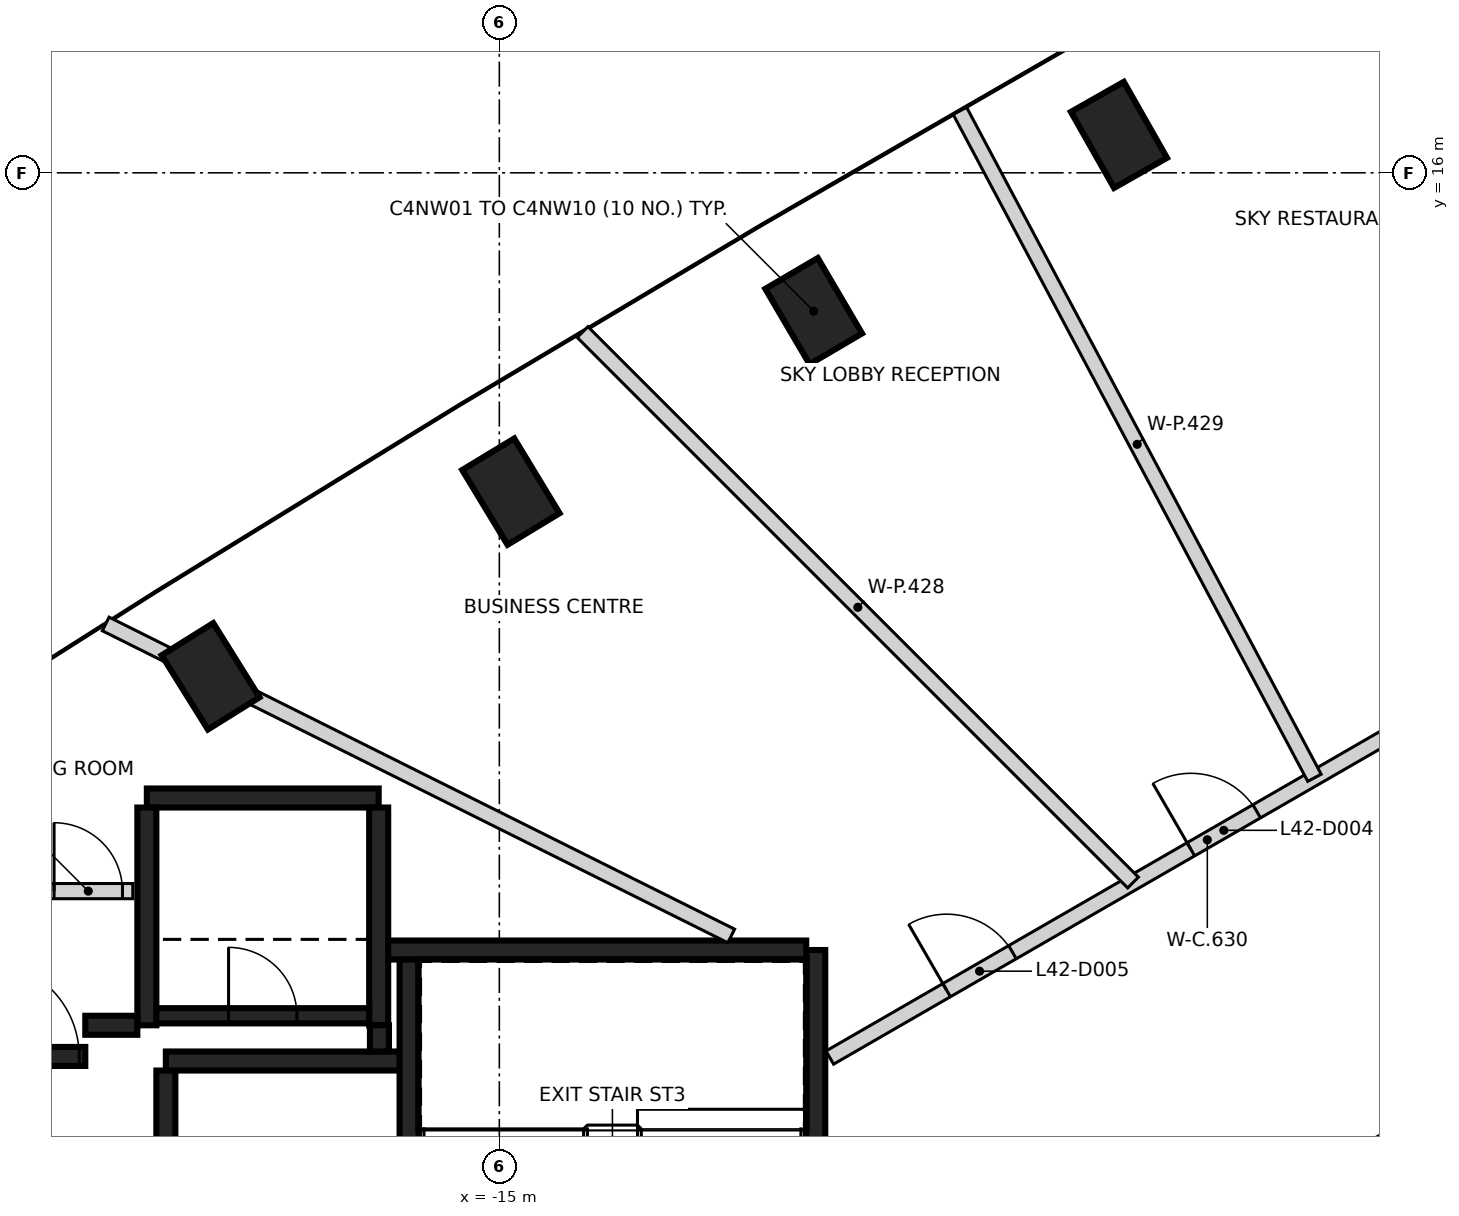
"""IFC4 building model, lengths in metres.
Left out: names, types, materials, properties, quantities, classifications, styles, units other than length and angle.
Written with IfcOpenShell. Run it as: python <this file> out.ifc"""

import sys

from ifc_helpers import new_model, si_unit, direction, frame, frame_2d, origin, origin_2d, place, context, subcontext, project, spatial, rectangle, extrude, element, fill, save


model = new_model("IFC4")
c1 = context("Model", 3, precision=1e-05, world=origin(), true_north=direction((0.0, 1.0)))
c2 = subcontext(c1, "Body", "Model", "MODEL_VIEW")
j1 = project(units=[si_unit("LENGTHUNIT", "METRE"), si_unit("PLANEANGLEUNIT", "RADIAN")], contexts=[c1])
p1 = place(None, origin())
s1 = spatial("IfcSite", under=j1, at=p1, CompositionType="ELEMENT")
p2 = place(p1, origin())
s2 = spatial("IfcBuilding", under=s1, at=p2, CompositionType="ELEMENT")
p3 = place(p2, frame((0.0, 0.0, 169.6)))
s3 = spatial("IfcBuildingStorey", under=s2, at=p3, CompositionType="ELEMENT", Elevation=169.6)
for number, where, z_axis, x_axis in (
    (1, (-6.848, 16.499, -0.35), (0.0, 0.0, 1.0), (-0.494, 0.87, 0.0)),
    (2, (-10.864, 14.18, -0.35), (0.0, 0.0, 1.0), (-0.506, 0.862, 0.0)),
    (3, (-14.848, 11.806, -0.35), (0.0, 0.0, 1.0), (-0.518, 0.855, 0.0)),
    (4, (-18.799, 9.376, -0.35), (0.0, 0.0, 1.0), (-0.529, 0.848, 0.0)),
):
    element("IfcColumn", number, at=place(p3, frame(where, z_axis=z_axis, x_axis=x_axis)), inside=s3, PredefinedType="COLUMN", context=c2, shape_type="SweptSolid", body=[
        extrude(rectangle(XDim=1.15, YDim=0.8, at=origin_2d()), origin(), (0.0, 0.0, 1.0), 6.0),
    ])
p4 = place(p3, frame((-10.837, 5.775, 0.0), z_axis=(0.0, 0.0, 1.0), x_axis=(0.0, -1.0, 0.0)))
e5 = element("IfcWall", 5, at=p4, inside=s3, PredefinedType="SHEAR", context=c2, shape_type="SweptSolid", body=[
    extrude(rectangle(XDim=11.55, YDim=0.25, at=frame_2d((5.775, 0.0))), origin(), (0.0, 0.0, 1.0), 5.65),
])
p5 = place(p4, frame((10.025, 0.0, 0.0)))
e6 = element("IfcOpeningElement", 6, at=p5, cuts=e5, PredefinedType="OPENING", context=c2, shape_type="SweptSolid", body=[
    extrude(rectangle(XDim=1.2, YDim=2.1, at=frame_2d((0.6, 1.05))), frame((0.0, 0.135, 0.0), z_axis=(0.0, -1.0, 0.0), x_axis=(1.0, 0.0, 0.0)), (0.0, 0.0, 1.0), 0.27),
])
p6 = place(p4, frame((8.725, 0.0, 0.0)))
e7 = element("IfcOpeningElement", 7, at=p6, cuts=e5, PredefinedType="OPENING", context=c2, shape_type="SweptSolid", body=[
    extrude(rectangle(XDim=1.2, YDim=2.1, at=frame_2d((0.6, 1.05))), frame((0.0, 0.135, 0.0), z_axis=(0.0, -1.0, 0.0), x_axis=(1.0, 0.0, 0.0)), (0.0, 0.0, 1.0), 0.27),
])
p7 = place(p3, frame((-16.472, 5.775, 0.0), z_axis=(0.0, 0.0, 1.0), x_axis=(1.0, 0.0, 0.0)))
e8 = element("IfcWall", 8, at=p7, inside=s3, PredefinedType="SHEAR", context=c2, shape_type="SweptSolid", body=[
    extrude(rectangle(XDim=5.51, YDim=0.25, at=frame_2d((2.755, 0.0))), origin(), (0.0, 0.0, 1.0), 5.65),
])
p8 = place(p3, frame((-19.637, 7.775, 0.0), z_axis=(0.0, 0.0, 1.0), x_axis=(1.0, 0.0, 0.0)))
e9 = element("IfcWall", 9, at=p8, inside=s3, PredefinedType="SHEAR", context=c2, shape_type="SweptSolid", body=[
    extrude(rectangle(XDim=3.05, YDim=0.25, at=frame_2d((1.525, 0.0))), origin(), (0.0, 0.0, 1.0), 5.65),
])
for number, where, z_axis, x_axis in (
    (10, (-16.587, 7.65, 0.0), (0.0, 0.0, 1.0), (0.0, -1.0, 0.0)),
    (11, (-19.637, 4.785, 0.0), (0.0, 0.0, 1.0), (0.0, 1.0, 0.0)),
):
    element("IfcWall", number, at=place(p3, frame(where, z_axis=z_axis, x_axis=x_axis)), inside=s3, PredefinedType="SHEAR", context=c2, shape_type="SweptSolid", body=[
        extrude(rectangle(XDim=2.865, YDim=0.25, at=frame_2d((1.432, 0.0))), origin(), (0.0, 0.0, 1.0), 5.65),
    ])
p9 = place(p3, frame((-16.302, 4.315, 0.0), z_axis=(0.0, 0.0, 1.0), x_axis=(-1.0, 0.0, 0.0)))
e12 = element("IfcWall", 12, at=p9, inside=s3, PredefinedType="SHEAR", context=c2, shape_type="SweptSolid", body=[
    extrude(rectangle(XDim=3.085, YDim=0.25, at=frame_2d((1.542, 0.0))), origin(), (0.0, 0.0, 1.0), 5.65),
])
p10 = place(p3, frame((-16.187, 3.2, 0.0), z_axis=(0.0, 0.0, 1.0), x_axis=(0.0, 1.0, 0.0)))
e13 = element("IfcWall", 13, at=p10, inside=s3, PredefinedType="SHEAR", context=c2, shape_type="SweptSolid", body=[
    extrude(rectangle(XDim=2.449, YDim=0.25, at=frame_2d((1.225, 0.0))), origin(), (0.0, 0.0, 1.0), 5.65),
])
p11 = place(p3, frame((-22.312, 4.375, 0.0), z_axis=(0.0, 0.0, 1.0), x_axis=(1.0, 0.0, 0.0)))
e14 = element("IfcWall", 14, at=p11, inside=s3, PredefinedType="SHEAR", context=c2, shape_type="SweptSolid", body=[
    extrude(rectangle(XDim=1.865, YDim=0.25, at=frame_2d((0.932, 0.0))), origin(), (0.0, 0.0, 1.0), 5.65),
])
p12 = place(p11, frame((0.535, 0.0, 0.0)))
e15 = element("IfcOpeningElement", 15, at=p12, cuts=e14, PredefinedType="OPENING", context=c2, shape_type="SweptSolid", body=[
    extrude(rectangle(XDim=1.25, YDim=2.1, at=frame_2d((0.625, 1.05))), frame((0.0, 0.135, 0.0), z_axis=(0.0, -1.0, 0.0), x_axis=(1.0, 0.0, 0.0)), (0.0, 0.0, 1.0), 0.27),
])
p13 = place(p3, frame((-19.387, 4.19, 0.0), z_axis=(0.0, 0.0, 1.0), x_axis=(0.0, -1.0, 0.0)))
e16 = element("IfcWall", 16, at=p13, inside=s3, PredefinedType="SHEAR", context=c2, shape_type="SweptSolid", body=[
    extrude(rectangle(XDim=0.989, YDim=0.25, at=frame_2d((0.495, 0.0))), origin(), (0.0, 0.0, 1.0), 5.65),
])
p14 = place(p3, frame((-20.447, 4.785, 0.0), z_axis=(0.0, 0.0, 1.0), x_axis=(1.0, 0.0, 0.0)))
e17 = element("IfcWall", 17, at=p14, inside=s3, PredefinedType="SHEAR", context=c2, shape_type="SweptSolid", body=[
    extrude(rectangle(XDim=0.685, YDim=0.25, at=frame_2d((0.342, 0.0))), origin(), (0.0, 0.0, 1.0), 5.65),
])
p15 = place(p3, frame((-16.577, 4.785, 0.0), z_axis=(0.0, 0.0, 1.0), x_axis=(0.0, -1.0, 0.0)))
e18 = element("IfcWall", 18, at=p15, inside=s3, PredefinedType="SHEAR", context=c2, shape_type="SweptSolid", body=[
    extrude(rectangle(XDim=0.344, YDim=0.25, at=frame_2d((0.172, 0.0))), origin(), (0.0, 0.0, 1.0), 5.65),
])
p16 = place(p3, frame((-19.511, 4.91, 0.0), z_axis=(0.0, 0.0, 1.0), x_axis=(1.0, 0.0, 0.0)))
e19 = element("IfcWall", 19, at=p16, inside=s3, PredefinedType="SHEAR", context=c2, shape_type="SweptSolid", body=[
    extrude(rectangle(XDim=2.798, YDim=0.2, at=frame_2d((1.399, 0.0))), origin(), (0.0, 0.0, 1.0), 5.65),
])
p17 = place(p16, frame((0.949, 0.0, 0.0)))
e20 = element("IfcOpeningElement", 20, at=p17, cuts=e19, PredefinedType="OPENING", context=c2, shape_type="SweptSolid", body=[
    extrude(rectangle(XDim=0.9, YDim=2.1, at=frame_2d((0.45, 1.05))), frame((0.0, 0.11, 0.0), z_axis=(0.0, -1.0, 0.0), x_axis=(1.0, 0.0, 0.0)), (0.0, 0.0, 1.0), 0.22),
])
p18 = place(p3, frame((-21.058, 6.55, 0.0), z_axis=(0.0, 0.0, 1.0), x_axis=(1.0, 0.0, 0.0)))
e21 = element("IfcWall", 21, at=p18, inside=s3, PredefinedType="PARTITIONING", context=c2, shape_type="SweptSolid", body=[
    extrude(rectangle(XDim=1.236, YDim=0.2, at=frame_2d((0.618, 0.0))), origin(), (0.0, 0.0, 1.0), 5.65),
])
p19 = place(p18, frame((0.2, 0.0, 0.0)))
e22 = element("IfcOpeningElement", 22, at=p19, cuts=e21, PredefinedType="OPENING", context=c2, shape_type="SweptSolid", body=[
    extrude(rectangle(XDim=0.9, YDim=2.1, at=frame_2d((0.45, 1.05))), frame((0.0, 0.11, 0.0), z_axis=(0.0, -1.0, 0.0), x_axis=(1.0, 0.0, 0.0)), (0.0, 0.0, 1.0), 0.22),
])
p20 = place(p3, frame((-10.652, 4.36, 0.0), z_axis=(0.0, 0.0, 1.0), x_axis=(0.866215711467, 0.499670232461, 0.0)))
e23 = element("IfcWall", 23, at=p20, inside=s3, PredefinedType="PARTITIONING", context=c2, shape_type="SweptSolid", body=[
    extrude(rectangle(XDim=11.468, YDim=0.2, at=frame_2d((5.734, 0.0))), origin(), (0.0, 0.0, 1.0), 5.65),
])
p21 = place(p20, frame((5.484, 0.0, 0.0)))
e24 = element("IfcOpeningElement", 24, at=p21, cuts=e23, PredefinedType="OPENING", context=c2, shape_type="SweptSolid", body=[
    extrude(rectangle(XDim=1.0, YDim=2.1, at=frame_2d((0.5, 1.05))), frame((0.0, 0.11, 0.0), z_axis=(0.0, -1.0, 0.0), x_axis=(1.0, 0.0, 0.0)), (0.0, 0.0, 1.0), 0.22),
])
p22 = place(p20, frame((1.775, 0.0, 0.0)))
e25 = element("IfcOpeningElement", 25, at=p22, cuts=e23, PredefinedType="OPENING", context=c2, shape_type="SweptSolid", body=[
    extrude(rectangle(XDim=1.0, YDim=2.1, at=frame_2d((0.5, 1.05))), frame((0.0, 0.11, 0.0), z_axis=(0.0, -1.0, 0.0), x_axis=(1.0, 0.0, 0.0)), (0.0, 0.0, 1.0), 0.22),
])
p23 = place(p3, frame((-20.179, 10.065, 0.0), z_axis=(0.0, 0.0, 1.0), x_axis=(0.894867434309, -0.446332023289, 0.0)))
e26 = element("IfcWall", 26, at=p23, inside=s3, PredefinedType="PARTITIONING", context=c2, shape_type="SweptSolid", body=[
    extrude(rectangle(XDim=9.197, YDim=0.2, at=frame_2d((4.598, 0.0))), origin(), (0.0, 0.0, 1.0), 5.65),
])
p24 = place(p3, frame((-13.905, 13.905, 0.0), z_axis=(0.0, 0.0, 1.0), x_axis=(0.707106781187, -0.707106781187, 0.0)))
e27 = element("IfcWall", 27, at=p24, inside=s3, PredefinedType="PARTITIONING", context=c2, shape_type="SweptSolid", body=[
    extrude(rectangle(XDim=10.241, YDim=0.2, at=frame_2d((5.121, 0.0))), origin(), (0.0, 0.0, 1.0), 4.75),
])
p25 = place(p3, frame((-8.941, 16.815, 0.0), z_axis=(0.0, 0.0, 1.0), x_axis=(0.469441422689, -0.882963617973, 0.0)))
e28 = element("IfcWall", 28, at=p25, inside=s3, PredefinedType="PARTITIONING", context=c2, shape_type="SweptSolid", body=[
    extrude(rectangle(XDim=9.937, YDim=0.2, at=frame_2d((4.969, 0.0))), origin(), (0.0, 0.0, 1.0), 4.75),
])
p26 = place(p12, origin())
e29 = element("IfcDoor", 29, at=p26, inside=s3, OperationType="SINGLE_SWING_LEFT", PredefinedType="DOOR", context=c2, shape_type="SweptSolid", body=[
    extrude(rectangle(XDim=1.25, YDim=2.1, at=frame_2d((0.625, 1.05))), frame((0.0, 0.025, 0.0), z_axis=(0.0, -1.0, 0.0), x_axis=(1.0, 0.0, 0.0)), (0.0, 0.0, 1.0), 0.05),
])
fill(e15, e29)
p27 = place(p17, origin())
e30 = element("IfcDoor", 30, at=p27, inside=s3, OperationType="SINGLE_SWING_RIGHT", PredefinedType="DOOR", context=c2, shape_type="SweptSolid", body=[
    extrude(rectangle(XDim=0.9, YDim=2.1, at=frame_2d((0.45, 1.05))), frame((0.0, 0.025, 0.0), z_axis=(0.0, -1.0, 0.0), x_axis=(1.0, 0.0, 0.0)), (0.0, 0.0, 1.0), 0.05),
])
fill(e20, e30)
p28 = place(p21, origin())
e31 = element("IfcDoor", 31, at=p28, inside=s3, OperationType="SINGLE_SWING_LEFT", PredefinedType="DOOR", context=c2, shape_type="SweptSolid", body=[
    extrude(rectangle(XDim=1.0, YDim=2.1, at=frame_2d((0.5, 1.05))), frame((0.0, 0.025, 0.0), z_axis=(0.0, -1.0, 0.0), x_axis=(1.0, 0.0, 0.0)), (0.0, 0.0, 1.0), 0.05),
])
fill(e24, e31)
p29 = place(p22, origin())
e32 = element("IfcDoor", 32, at=p29, inside=s3, OperationType="SINGLE_SWING_LEFT", PredefinedType="DOOR", context=c2, shape_type="SweptSolid", body=[
    extrude(rectangle(XDim=1.0, YDim=2.1, at=frame_2d((0.5, 1.05))), frame((0.0, 0.025, 0.0), z_axis=(0.0, -1.0, 0.0), x_axis=(1.0, 0.0, 0.0)), (0.0, 0.0, 1.0), 0.05),
])
fill(e25, e32)
p30 = place(p19, origin())
e33 = element("IfcDoor", 33, at=p30, inside=s3, OperationType="SINGLE_SWING_LEFT", PredefinedType="DOOR", context=c2, shape_type="SweptSolid", body=[
    extrude(rectangle(XDim=0.9, YDim=2.1, at=frame_2d((0.45, 1.05))), frame((0.0, 0.025, 0.0), z_axis=(0.0, -1.0, 0.0), x_axis=(1.0, 0.0, 0.0)), (0.0, 0.0, 1.0), 0.05),
])
fill(e22, e33)
save(model, sys.argv[1])
